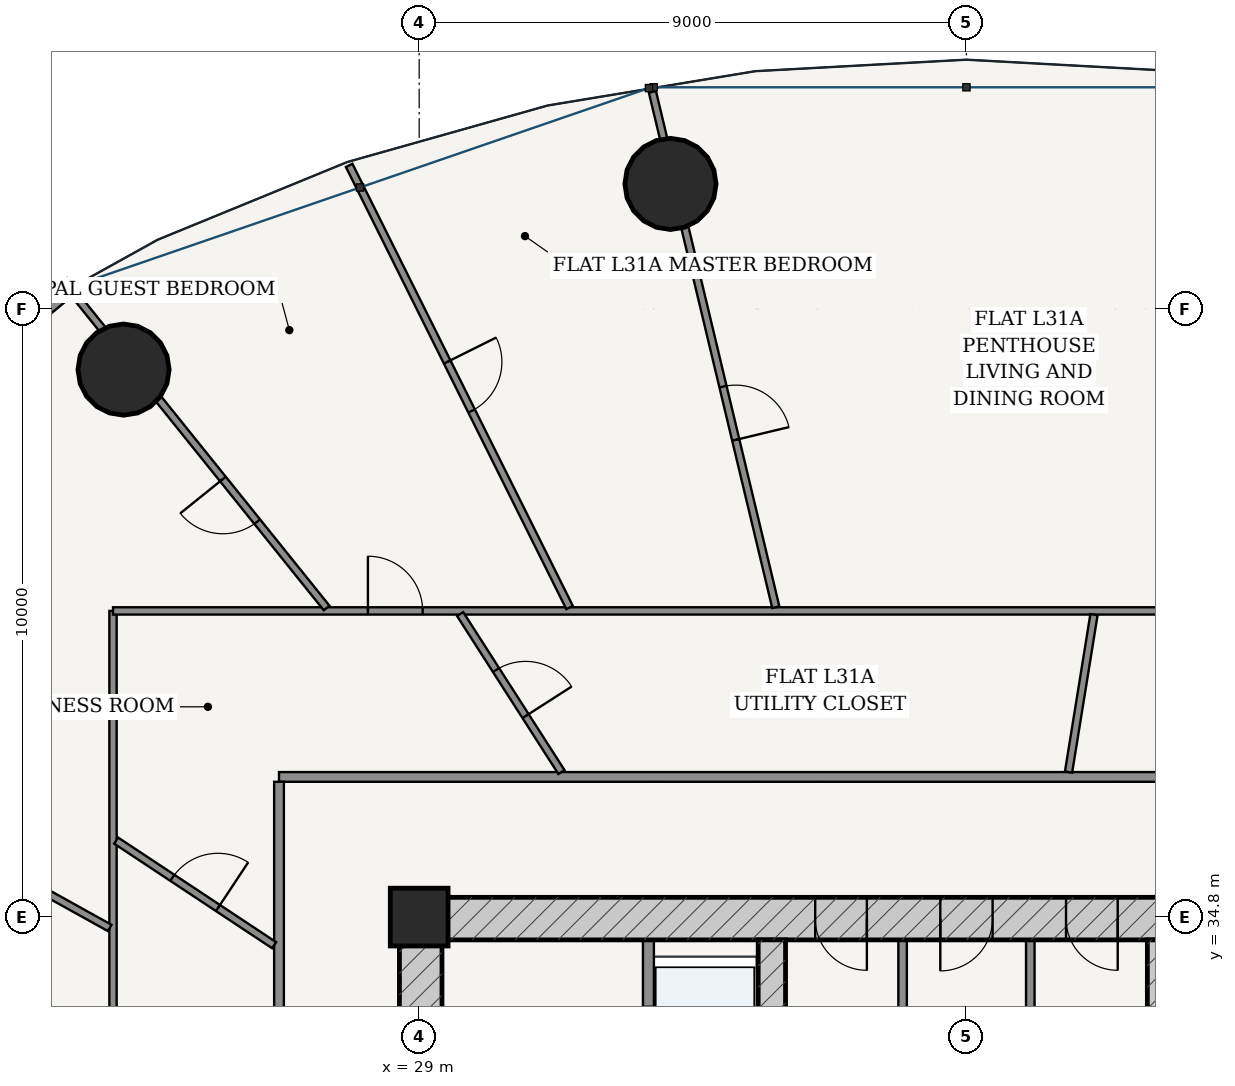
"""IFC4 building model, lengths in metres.
Left out: names, types, materials, properties, quantities, classifications, styles, units other than length and angle.
Written with IfcOpenShell. Run it as: python <this file> out.ifc"""

import sys

from ifc_helpers import new_model, si_unit, direction, frame, frame_2d, origin, origin_2d, place, context, subcontext, project, spatial, rectangle, hollow_circle, extrude, source, transform, mapped, element, fill, save


model = new_model("IFC4")
c1 = context("Model", 3, precision=1e-05, world=origin(), true_north=direction((-0.2419218956, 0.970295726276)))
c2 = subcontext(c1, "Body", "Model", "MODEL_VIEW")
j1 = project(units=[si_unit("LENGTHUNIT", "METRE"), si_unit("PLANEANGLEUNIT", "RADIAN")], contexts=[c1])
p1 = place(None, origin())
s1 = spatial("IfcSite", under=j1, at=p1, CompositionType="ELEMENT")
p2 = place(p1, origin())
s2 = spatial("IfcBuilding", under=s1, at=p2, CompositionType="ELEMENT")
p3 = place(p2, frame((0.0, 0.0, 119.4)))
s3 = spatial("IfcBuildingStorey", under=s2, at=p3, CompositionType="ELEMENT", Elevation=119.4)
p4 = place(p3, frame((29.0, 34.8, 0.0), z_axis=(0.0, 0.0, 1.0), x_axis=(1.0, 0.0, 0.0)))
e1 = element("IfcColumn", 1, at=p4, inside=s3, PredefinedType="COLUMN", context=c2, shape_type="SweptSolid", body=[
    extrude(rectangle(XDim=0.95, YDim=0.95, at=origin_2d()), origin(), (0.0, 0.0, 1.0), 3.6),
])
p5 = place(p3, frame((28.675, 34.775, 0.0), z_axis=(0.0, 0.0, 1.0), x_axis=(1.0, 0.0, 0.0)))
e2 = element("IfcWall", 2, at=p5, inside=s3, PredefinedType="SHEAR", context=c2, shape_type="SweptSolid", body=[
    extrude(rectangle(XDim=18.65, YDim=0.7, at=frame_2d((9.325, 0.0))), origin(), (0.0, 0.0, 1.0), 3.325),
])
p6 = place(p5, frame((6.837, 0.0, 0.0)))
e3 = element("IfcOpeningElement", 3, at=p6, cuts=e2, PredefinedType="OPENING", context=c2, shape_type="SweptSolid", body=[
    extrude(rectangle(XDim=0.85, YDim=2.1, at=frame_2d((0.425, 1.05))), frame((0.0, 0.36, 0.0), z_axis=(0.0, -1.0, 0.0), x_axis=(1.0, 0.0, 0.0)), (0.0, 0.0, 1.0), 0.72),
])
p7 = place(p5, frame((8.895, 0.0, 0.0)))
e4 = element("IfcOpeningElement", 4, at=p7, cuts=e2, PredefinedType="OPENING", context=c2, shape_type="SweptSolid", body=[
    extrude(rectangle(XDim=0.86, YDim=2.1, at=frame_2d((0.43, 1.05))), frame((0.0, 0.36, 0.0), z_axis=(0.0, -1.0, 0.0), x_axis=(1.0, 0.0, 0.0)), (0.0, 0.0, 1.0), 0.72),
])
p8 = place(p5, frame((10.962, 0.0, 0.0)))
e5 = element("IfcOpeningElement", 5, at=p8, cuts=e2, PredefinedType="OPENING", context=c2, shape_type="SweptSolid", body=[
    extrude(rectangle(XDim=0.85, YDim=2.1, at=frame_2d((0.425, 1.05))), frame((0.0, 0.36, 0.0), z_axis=(0.0, -1.0, 0.0), x_axis=(1.0, 0.0, 0.0)), (0.0, 0.0, 1.0), 0.72),
])
p9 = place(p3, frame((29.025, 19.175, 0.0), z_axis=(0.0, 0.0, 1.0), x_axis=(0.0, 1.0, 0.0)))
e6 = element("IfcWall", 6, at=p9, inside=s3, PredefinedType="SHEAR", context=c2, shape_type="SweptSolid", body=[
    extrude(rectangle(XDim=15.25, YDim=0.7, at=frame_2d((7.625, 0.0))), origin(), (0.0, 0.0, 1.0), 3.325),
])
p10 = place(p9, frame((9.875, 0.0, 0.0)))
e7 = element("IfcOpeningElement", 7, at=p10, cuts=e6, PredefinedType="OPENING", context=c2, shape_type="SweptSolid", body=[
    extrude(rectangle(XDim=1.5, YDim=2.2, at=frame_2d((0.75, 1.1))), frame((0.0, 0.36, 0.0), z_axis=(0.0, -1.0, 0.0), x_axis=(1.0, 0.0, 0.0)), (0.0, 0.0, 1.0), 0.72),
])
p11 = place(p3, frame((34.8, 19.175, 0.0), z_axis=(0.0, 0.0, 1.0), x_axis=(0.0, 1.0, 0.0)))
e8 = element("IfcWall", 8, at=p11, inside=s3, PredefinedType="SHEAR", context=c2, shape_type="SweptSolid", body=[
    extrude(rectangle(XDim=15.25, YDim=0.45, at=frame_2d((7.625, 0.0))), origin(), (0.0, 0.0, 1.0), 3.325),
])
p12 = place(p11, frame((7.8, 0.0, 0.0)))
e9 = element("IfcOpeningElement", 9, at=p12, cuts=e8, PredefinedType="OPENING", context=c2, shape_type="SweptSolid", body=[
    extrude(rectangle(XDim=1.05, YDim=2.15, at=frame_2d((0.525, 1.075))), frame((0.0, 0.235, 0.0), z_axis=(0.0, -1.0, 0.0), x_axis=(1.0, 0.0, 0.0)), (0.0, 0.0, 1.0), 0.47),
])
p13 = place(p3, frame((41.2, 19.175, 0.0), z_axis=(0.0, 0.0, 1.0), x_axis=(0.0, 1.0, 0.0)))
e10 = element("IfcWall", 10, at=p13, inside=s3, PredefinedType="SHEAR", context=c2, shape_type="SweptSolid", body=[
    extrude(rectangle(XDim=15.25, YDim=0.45, at=frame_2d((7.625, 0.0))), origin(), (0.0, 0.0, 1.0), 3.325),
])
p14 = place(p13, frame((7.8, 0.0, 0.0)))
e11 = element("IfcOpeningElement", 11, at=p14, cuts=e10, PredefinedType="OPENING", context=c2, shape_type="SweptSolid", body=[
    extrude(rectangle(XDim=1.05, YDim=2.15, at=frame_2d((0.525, 1.075))), frame((0.0, 0.235, 0.0), z_axis=(0.0, -1.0, 0.0), x_axis=(1.0, 0.0, 0.0)), (0.0, 0.0, 1.0), 0.47),
])
for number, where, z_axis, x_axis in (
    (12, (33.133, 46.857, 0.0), (0.0, 0.0, 1.0), (1.0, 0.0, 0.0)),
    (13, (24.138, 43.803, 0.0), (0.0, 0.0, 1.0), (1.0, 0.0, 0.0)),
):
    element("IfcColumn", number, at=place(p3, frame(where, z_axis=z_axis, x_axis=x_axis)), inside=s3, PredefinedType="COLUMN", context=c2, shape_type="SweptSolid", body=[
        extrude(hollow_circle(Radius=0.75, WallThickness=0.045, at=origin_2d()), origin(), (0.0, 0.0, 1.0), 3.6),
    ])
p15 = place(p3, frame((23.3, 45.202, 0.0), z_axis=(0.0, 0.0, 1.0), x_axis=(-0.769242574941, -0.638956853706, 0.0)))
e14 = element("IfcWall", 14, at=p15, inside=s3, PredefinedType="SOLIDWALL", context=c2, shape_type="SweptSolid", body=[
    extrude(rectangle(XDim=9.69, YDim=0.28, at=frame_2d((4.845, 0.0))), origin(), (0.0, 0.0, 1.0), 3.325),
])
p16 = place(p15, frame((1.566, 0.0, 0.85)))
e15 = element("IfcOpeningElement", 15, at=p16, cuts=e14, PredefinedType="OPENING", context=c2, shape_type="SweptSolid", body=[
    extrude(rectangle(XDim=2.1, YDim=1.95, at=frame_2d((1.05, 0.975))), frame((0.0, 0.15, 0.0), z_axis=(0.0, -1.0, 0.0), x_axis=(1.0, 0.0, 0.0)), (0.0, 0.0, 1.0), 0.3),
])
p17 = place(p15, frame((6.023, 0.0, 0.85)))
e16 = element("IfcOpeningElement", 16, at=p17, cuts=e14, PredefinedType="OPENING", context=c2, shape_type="SweptSolid", body=[
    extrude(rectangle(XDim=2.1, YDim=1.95, at=frame_2d((1.05, 0.975))), frame((0.0, 0.15, 0.0), z_axis=(0.0, -1.0, 0.0), x_axis=(1.0, 0.0, 0.0)), (0.0, 0.0, 1.0), 0.3),
])
p18 = place(p3, frame((32.77, 28.52, 0.0), z_axis=(0.0, 0.0, 1.0), x_axis=(0.0, 1.0, 0.0)))
e17 = element("IfcWall", 17, at=p18, inside=s3, PredefinedType="PARTITIONING", context=c2, shape_type="SweptSolid", body=[
    extrude(rectangle(XDim=5.905, YDim=0.18, at=frame_2d((2.953, 0.0))), origin(), (0.0, 0.0, 1.0), 3.325),
])
p19 = place(p18, frame((3.655, 0.0, 0.0)))
e18 = element("IfcOpeningElement", 18, at=p19, cuts=e17, PredefinedType="OPENING", context=c2, shape_type="SweptSolid", body=[
    extrude(rectangle(XDim=1.15, YDim=2.2, at=frame_2d((0.575, 1.1))), frame((0.0, 0.1, 0.0), z_axis=(0.0, -1.0, 0.0), x_axis=(1.0, 0.0, 0.0)), (0.0, 0.0, 1.0), 0.2),
])
p20 = place(p18, frame((0.73, 0.0, 0.0)))
e19 = element("IfcOpeningElement", 19, at=p20, cuts=e17, PredefinedType="OPENING", context=c2, shape_type="SweptSolid", body=[
    extrude(rectangle(XDim=1.2, YDim=2.25, at=frame_2d((0.6, 1.125))), frame((0.0, 0.1, 0.0), z_axis=(0.0, -1.0, 0.0), x_axis=(1.0, 0.0, 0.0)), (0.0, 0.0, 1.0), 0.2),
])
for number, where, z_axis, x_axis in (
    (20, (36.95, 31.2, 0.0), (0.0, 0.0, 1.0), (0.0, 1.0, 0.0)),
    (21, (39.05, 31.2, 0.0), (0.0, 0.0, 1.0), (0.0, 1.0, 0.0)),
):
    element("IfcWall", number, at=place(p3, frame(where, z_axis=z_axis, x_axis=x_axis)), inside=s3, PredefinedType="PARTITIONING", context=c2, shape_type="SweptSolid", body=[
        extrude(rectangle(XDim=3.225, YDim=0.14, at=frame_2d((1.613, 0.0))), origin(), (0.0, 0.0, 1.0), 3.325),
    ])
p21 = place(p3, frame((26.695, 37.105, 0.0), z_axis=(0.0, 0.0, 1.0), x_axis=(1.0, 0.0, 0.0)))
e22 = element("IfcWall", 22, at=p21, inside=s3, PredefinedType="PARTITIONING", context=c2, shape_type="SweptSolid", body=[
    extrude(rectangle(XDim=22.61, YDim=0.16, at=frame_2d((11.305, 0.0))), origin(), (0.0, 0.0, 1.0), 2.767),
])
p22 = place(p3, frame((26.695, 16.575, 0.0), z_axis=(0.0, 0.0, 1.0), x_axis=(0.0, 1.0, 0.0)))
e23 = element("IfcWall", 23, at=p22, inside=s3, PredefinedType="PARTITIONING", context=c2, shape_type="SweptSolid", body=[
    extrude(rectangle(XDim=20.45, YDim=0.16, at=frame_2d((10.225, 0.0))), origin(), (0.0, 0.0, 1.0), 2.767),
])
p23 = place(p22, frame((2.424, 0.0, 0.0)))
e24 = element("IfcOpeningElement", 24, at=p23, cuts=e23, PredefinedType="OPENING", context=c2, shape_type="SweptSolid", body=[
    extrude(rectangle(XDim=0.98, YDim=2.2, at=frame_2d((0.49, 1.1))), frame((0.0, 0.09, 0.0), z_axis=(0.0, -1.0, 0.0), x_axis=(1.0, 0.0, 0.0)), (0.0, 0.0, 1.0), 0.18),
])
p24 = place(p3, frame((23.965, 13.765, 0.0), z_axis=(0.0, 0.0, 1.0), x_axis=(0.0, 1.0, 0.0)))
e25 = element("IfcWall", 25, at=p24, inside=s3, PredefinedType="PARTITIONING", context=c2, shape_type="SweptSolid", body=[
    extrude(rectangle(XDim=26.07, YDim=0.12, at=frame_2d((13.035, 0.0))), origin(), (0.0, 0.0, 1.0), 2.767),
])
p25 = place(p24, frame((3.362, 0.0, 0.0)))
e26 = element("IfcOpeningElement", 26, at=p25, cuts=e25, PredefinedType="OPENING", context=c2, shape_type="SweptSolid", body=[
    extrude(rectangle(XDim=0.9, YDim=2.15, at=frame_2d((0.45, 1.075))), frame((0.0, 0.07, 0.0), z_axis=(0.0, -1.0, 0.0), x_axis=(1.0, 0.0, 0.0)), (0.0, 0.0, 1.0), 0.14),
])
p26 = place(p24, frame((13.924, 0.0, 0.0)))
e27 = element("IfcOpeningElement", 27, at=p26, cuts=e25, PredefinedType="OPENING", context=c2, shape_type="SweptSolid", body=[
    extrude(rectangle(XDim=0.9, YDim=2.15, at=frame_2d((0.45, 1.075))), frame((0.0, 0.07, 0.0), z_axis=(0.0, -1.0, 0.0), x_axis=(1.0, 0.0, 0.0)), (0.0, 0.0, 1.0), 0.14),
])
p27 = place(p3, frame((23.965, 39.835, 0.0), z_axis=(0.0, 0.0, 1.0), x_axis=(1.0, 0.0, 0.0)))
e28 = element("IfcWall", 28, at=p27, inside=s3, PredefinedType="PARTITIONING", context=c2, shape_type="SweptSolid", body=[
    extrude(rectangle(XDim=24.416, YDim=0.12, at=frame_2d((12.208, 0.0))), origin(), (0.0, 0.0, 1.0), 2.767),
])
p28 = place(p27, frame((4.192, 0.0, 0.0)))
e29 = element("IfcOpeningElement", 29, at=p28, cuts=e28, PredefinedType="OPENING", context=c2, shape_type="SweptSolid", body=[
    extrude(rectangle(XDim=0.9, YDim=2.15, at=frame_2d((0.45, 1.075))), frame((0.0, 0.07, 0.0), z_axis=(0.0, -1.0, 0.0), x_axis=(1.0, 0.0, 0.0)), (0.0, 0.0, 1.0), 0.14),
])
p29 = place(p27, frame((19.728, 0.0, 0.0)))
e30 = element("IfcOpeningElement", 30, at=p29, cuts=e28, PredefinedType="OPENING", context=c2, shape_type="SweptSolid", body=[
    extrude(rectangle(XDim=0.86, YDim=2.15, at=frame_2d((0.43, 1.075))), frame((0.0, 0.07, 0.0), z_axis=(0.0, -1.0, 0.0), x_axis=(1.0, 0.0, 0.0)), (0.0, 0.0, 1.0), 0.14),
])
p30 = place(p3, frame((34.865, 39.895, 0.0), z_axis=(0.0, 0.0, 1.0), x_axis=(-0.23282725047, 0.97251810854, 0.0)))
e31 = element("IfcWall", 31, at=p30, inside=s3, PredefinedType="PARTITIONING", context=c2, shape_type="SweptSolid", body=[
    extrude(rectangle(XDim=8.715, YDim=0.12, at=frame_2d((4.357, 0.0))), origin(), (0.0, 0.0, 1.0), 2.767),
])
p31 = place(p30, frame((2.831, 0.0, 0.0)))
e32 = element("IfcOpeningElement", 32, at=p31, cuts=e31, PredefinedType="OPENING", context=c2, shape_type="SweptSolid", body=[
    extrude(rectangle(XDim=0.9, YDim=2.15, at=frame_2d((0.45, 1.075))), frame((0.0, 0.07, 0.0), z_axis=(0.0, -1.0, 0.0), x_axis=(1.0, 0.0, 0.0)), (0.0, 0.0, 1.0), 0.14),
])
p32 = place(p3, frame((31.474, 39.89, 0.0), z_axis=(0.0, 0.0, 1.0), x_axis=(-0.446167584581, 0.894949432353, 0.0)))
e33 = element("IfcWall", 33, at=p32, inside=s3, PredefinedType="PARTITIONING", context=c2, shape_type="SweptSolid", body=[
    extrude(rectangle(XDim=8.125, YDim=0.12, at=frame_2d((4.062, 0.0))), origin(), (0.0, 0.0, 1.0), 2.767),
])
p33 = place(p32, frame((3.612, 0.0, 0.0)))
e34 = element("IfcOpeningElement", 34, at=p33, cuts=e33, PredefinedType="OPENING", context=c2, shape_type="SweptSolid", body=[
    extrude(rectangle(XDim=0.9, YDim=2.15, at=frame_2d((0.45, 1.075))), frame((0.0, 0.07, 0.0), z_axis=(0.0, -1.0, 0.0), x_axis=(1.0, 0.0, 0.0)), (0.0, 0.0, 1.0), 0.14),
])
p34 = place(p3, frame((27.478, 39.883, 0.0), z_axis=(0.0, 0.0, 1.0), x_axis=(-0.62672583251, 0.779239841682, 0.0)))
e35 = element("IfcWall", 35, at=p34, inside=s3, PredefinedType="PARTITIONING", context=c2, shape_type="SweptSolid", body=[
    extrude(rectangle(XDim=6.678, YDim=0.12, at=frame_2d((3.339, 0.0))), origin(), (0.0, 0.0, 1.0), 2.767),
])
p35 = place(p34, frame((1.821, 0.0, 0.0)))
e36 = element("IfcOpeningElement", 36, at=p35, cuts=e35, PredefinedType="OPENING", context=c2, shape_type="SweptSolid", body=[
    extrude(rectangle(XDim=0.9, YDim=2.15, at=frame_2d((0.45, 1.075))), frame((0.0, 0.07, 0.0), z_axis=(0.0, -1.0, 0.0), x_axis=(1.0, 0.0, 0.0)), (0.0, 0.0, 1.0), 0.14),
])
p36 = place(p3, frame((23.911, 34.622, 0.0), z_axis=(0.0, 0.0, 1.0), x_axis=(-0.874324904351, 0.485341077626, 0.0)))
e37 = element("IfcWall", 37, at=p36, inside=s3, PredefinedType="PARTITIONING", context=c2, shape_type="SweptSolid", body=[
    extrude(rectangle(XDim=9.066, YDim=0.12, at=frame_2d((4.533, 0.0))), origin(), (0.0, 0.0, 1.0), 2.767),
])
p37 = place(p3, frame((23.906, 31.65, 0.0), z_axis=(0.0, 0.0, 1.0), x_axis=(-0.945573120726, 0.32540970078, 0.0)))
e38 = element("IfcWall", 38, at=p37, inside=s3, PredefinedType="PARTITIONING", context=c2, shape_type="SweptSolid", body=[
    extrude(rectangle(XDim=11.022, YDim=0.12, at=frame_2d((5.511, 0.0))), origin(), (0.0, 0.0, 1.0), 2.767),
])
p38 = place(p37, frame((5.061, 0.0, 0.0)))
e39 = element("IfcOpeningElement", 39, at=p38, cuts=e38, PredefinedType="OPENING", context=c2, shape_type="SweptSolid", body=[
    extrude(rectangle(XDim=0.9, YDim=2.15, at=frame_2d((0.45, 1.075))), frame((0.0, 0.07, 0.0), z_axis=(0.0, -1.0, 0.0), x_axis=(1.0, 0.0, 0.0)), (0.0, 0.0, 1.0), 0.14),
])
p39 = place(p3, frame((39.679, 37.185, 0.0), z_axis=(0.0, 0.0, 1.0), x_axis=(0.159580767408, 0.98718487563, 0.0)))
e40 = element("IfcWall", 40, at=p39, inside=s3, PredefinedType="PARTITIONING", context=c2, shape_type="SweptSolid", body=[
    extrude(rectangle(XDim=2.622, YDim=0.12, at=frame_2d((1.311, 0.0))), origin(), (0.0, 0.0, 1.0), 3.325),
])
p40 = place(p3, frame((31.34, 37.185, 0.0), z_axis=(0.0, 0.0, 1.0), x_axis=(-0.539861631895, 0.841753775405, 0.0)))
e41 = element("IfcWall", 41, at=p40, inside=s3, PredefinedType="PARTITIONING", context=c2, shape_type="SweptSolid", body=[
    extrude(rectangle(XDim=3.086, YDim=0.12, at=frame_2d((1.543, 0.0))), origin(), (0.0, 0.0, 1.0), 3.325),
])
p41 = place(p40, frame((1.093, 0.0, 0.0)))
e42 = element("IfcOpeningElement", 42, at=p41, cuts=e41, PredefinedType="OPENING", context=c2, shape_type="SweptSolid", body=[
    extrude(rectangle(XDim=0.9, YDim=2.15, at=frame_2d((0.45, 1.075))), frame((0.0, 0.07, 0.0), z_axis=(0.0, -1.0, 0.0), x_axis=(1.0, 0.0, 0.0)), (0.0, 0.0, 1.0), 0.14),
])
p42 = place(p3, frame((26.615, 34.337, 0.0), z_axis=(0.0, 0.0, 1.0), x_axis=(-0.833829855758, 0.552021531868, 0.0)))
e43 = element("IfcWall", 43, at=p42, inside=s3, PredefinedType="PARTITIONING", context=c2, shape_type="SweptSolid", body=[
    extrude(rectangle(XDim=3.116, YDim=0.12, at=frame_2d((1.558, 0.0))), origin(), (0.0, 0.0, 1.0), 3.325),
])
p43 = place(p42, frame((1.108, 0.0, 0.0)))
e44 = element("IfcOpeningElement", 44, at=p43, cuts=e43, PredefinedType="OPENING", context=c2, shape_type="SweptSolid", body=[
    extrude(rectangle(XDim=0.9, YDim=2.15, at=frame_2d((0.45, 1.075))), frame((0.0, 0.07, 0.0), z_axis=(0.0, -1.0, 0.0), x_axis=(1.0, 0.0, 0.0)), (0.0, 0.0, 1.0), 0.14),
])
m1 = source(origin(), c2, "Body", "SweptSolid", [
    extrude(rectangle(XDim=0.85, YDim=2.1, at=frame_2d((0.425, 1.05))), frame((0.0, 0.025, 0.0), z_axis=(0.0, -1.0, 0.0), x_axis=(1.0, 0.0, 0.0)), (0.0, 0.0, 1.0), 0.05),
])
p44 = place(p6, frame((0.85, 0.0, 0.0), z_axis=(0.0, 0.0, 1.0), x_axis=(-1.0, 0.0, 0.0)))
e45 = element("IfcDoor", 45, at=p44, inside=s3, OperationType="SINGLE_SWING_LEFT", PredefinedType="DOOR", context=c2, shape_type="MappedRepresentation", body=[
    mapped(m1, transform((0.0, 0.0, 0.0), scale=1.0)),
])
fill(e3, e45)
m2 = source(origin(), c2, "Body", "SweptSolid", [
    extrude(rectangle(XDim=0.86, YDim=2.1, at=frame_2d((0.43, 1.05))), frame((0.0, 0.025, 0.0), z_axis=(0.0, -1.0, 0.0), x_axis=(1.0, 0.0, 0.0)), (0.0, 0.0, 1.0), 0.05),
])
p45 = place(p7, frame((0.86, 0.0, 0.0), z_axis=(0.0, 0.0, 1.0), x_axis=(-1.0, 0.0, 0.0)))
e46 = element("IfcDoor", 46, at=p45, inside=s3, OperationType="SINGLE_SWING_RIGHT", PredefinedType="DOOR", context=c2, shape_type="MappedRepresentation", body=[
    mapped(m2, transform((0.0, 0.0, 0.0), scale=1.0)),
])
fill(e4, e46)
p46 = place(p8, frame((0.85, 0.0, 0.0), z_axis=(0.0, 0.0, 1.0), x_axis=(-1.0, 0.0, 0.0)))
e47 = element("IfcDoor", 47, at=p46, inside=s3, OperationType="SINGLE_SWING_LEFT", PredefinedType="DOOR", context=c2, shape_type="MappedRepresentation", body=[
    mapped(m1, transform((0.0, 0.0, 0.0), scale=1.0)),
])
fill(e5, e47)
m3 = source(origin(), c2, "Body", "SweptSolid", [
    extrude(rectangle(XDim=0.9, YDim=2.15, at=frame_2d((0.45, 1.075))), frame((0.0, 0.025, 0.0), z_axis=(0.0, -1.0, 0.0), x_axis=(1.0, 0.0, 0.0)), (0.0, 0.0, 1.0), 0.05),
])
p47 = place(p43, frame((0.9, 0.0, 0.0), z_axis=(0.0, 0.0, 1.0), x_axis=(-1.0, 0.0, 0.0)))
e48 = element("IfcDoor", 48, at=p47, inside=s3, OperationType="SINGLE_SWING_RIGHT", PredefinedType="DOOR", context=c2, shape_type="MappedRepresentation", body=[
    mapped(m3, transform((0.0, 0.0, 0.0), scale=1.0)),
])
fill(e44, e48)
p48 = place(p28, origin())
e49 = element("IfcDoor", 49, at=p48, inside=s3, OperationType="SINGLE_SWING_LEFT", PredefinedType="DOOR", context=c2, shape_type="MappedRepresentation", body=[
    mapped(m3, transform((0.0, 0.0, 0.0), scale=1.0)),
])
fill(e29, e49)
p49 = place(p35, origin())
e50 = element("IfcDoor", 50, at=p49, inside=s3, OperationType="SINGLE_SWING_RIGHT", PredefinedType="DOOR", context=c2, shape_type="MappedRepresentation", body=[
    mapped(m3, transform((0.0, 0.0, 0.0), scale=1.0)),
])
fill(e36, e50)
p50 = place(p41, frame((0.9, 0.0, 0.0), z_axis=(0.0, 0.0, 1.0), x_axis=(-1.0, 0.0, 0.0)))
e51 = element("IfcDoor", 51, at=p50, inside=s3, OperationType="SINGLE_SWING_RIGHT", PredefinedType="DOOR", context=c2, shape_type="MappedRepresentation", body=[
    mapped(m3, transform((0.0, 0.0, 0.0), scale=1.0)),
])
fill(e42, e51)
p51 = place(p33, frame((0.9, 0.0, 0.0), z_axis=(0.0, 0.0, 1.0), x_axis=(-1.0, 0.0, 0.0)))
e52 = element("IfcDoor", 52, at=p51, inside=s3, OperationType="SINGLE_SWING_LEFT", PredefinedType="DOOR", context=c2, shape_type="MappedRepresentation", body=[
    mapped(m3, transform((0.0, 0.0, 0.0), scale=1.0)),
])
fill(e34, e52)
p52 = place(p31, frame((0.9, 0.0, 0.0), z_axis=(0.0, 0.0, 1.0), x_axis=(-1.0, 0.0, 0.0)))
e53 = element("IfcDoor", 53, at=p52, inside=s3, OperationType="SINGLE_SWING_RIGHT", PredefinedType="DOOR", context=c2, shape_type="MappedRepresentation", body=[
    mapped(m3, transform((0.0, 0.0, 0.0), scale=1.0)),
])
fill(e32, e53)
save(model, sys.argv[1])
